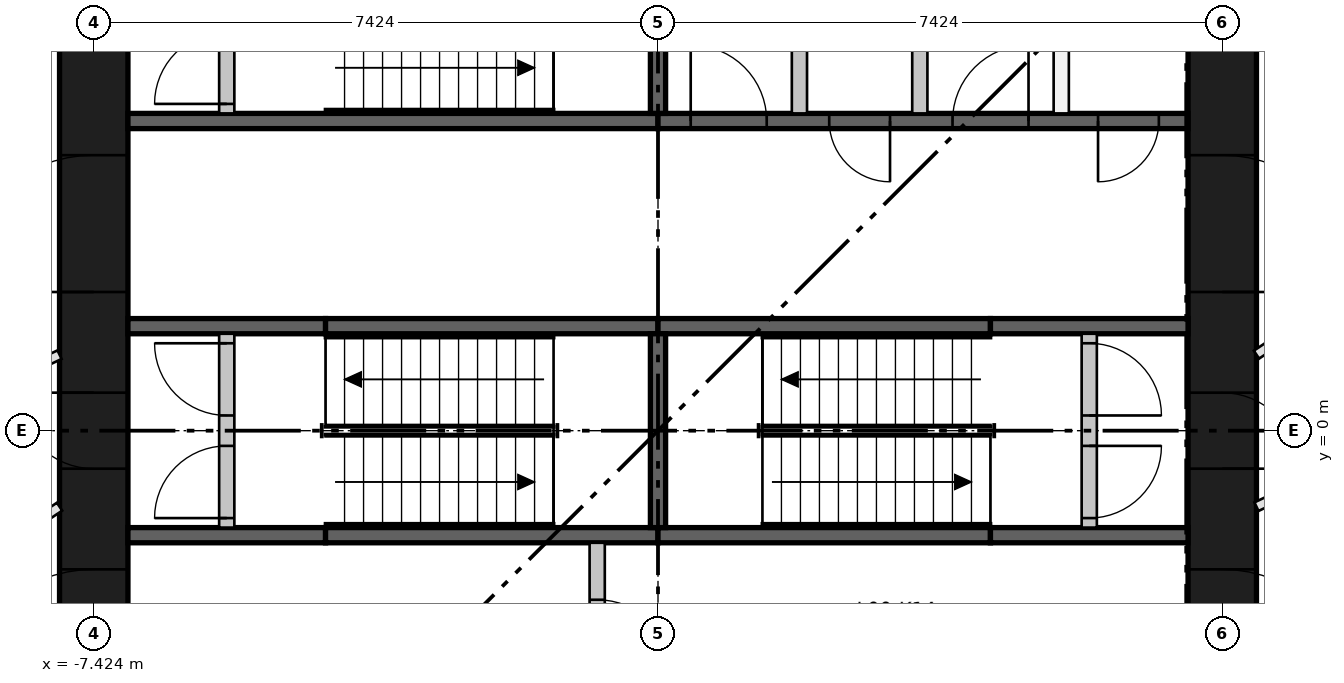
"""IFC4 building model, lengths in metres.
Left out: names, types, materials, properties, quantities, classifications, styles, units other than length and angle.
Written with IfcOpenShell. Run it as: python <this file> out.ifc"""

import sys

from ifc_helpers import new_model, si_unit, direction, frame, frame_2d, origin, place, context, subcontext, project, spatial, rectangle, extrude, element, fill, save


model = new_model("IFC4")
c1 = context("Model", 3, precision=1e-05, world=origin(), true_north=direction((0.0, 1.0)))
c2 = subcontext(c1, "Body", "Model", "MODEL_VIEW")
j1 = project(units=[si_unit("LENGTHUNIT", "METRE"), si_unit("PLANEANGLEUNIT", "RADIAN")], contexts=[c1])
p1 = place(None, origin())
s1 = spatial("IfcSite", under=j1, at=p1, CompositionType="ELEMENT")
p2 = place(p1, origin())
s2 = spatial("IfcBuilding", under=s1, at=p2, CompositionType="ELEMENT")
p3 = place(p2, origin())
s3 = spatial("IfcBuildingStorey", under=s2, at=p3, CompositionType="ELEMENT", Elevation=0.0)
p4 = place(p3, frame((-7.424, -6.974, -0.4), z_axis=(0.0, 0.0, 1.0), x_axis=(0.0, 1.0, 0.0)))
e1 = element("IfcWall", 1, at=p4, inside=s3, PredefinedType="SHEAR", context=c2, shape_type="SweptSolid", body=[
    extrude(rectangle(XDim=13.948, YDim=0.9, at=frame_2d((6.974, 0.0))), origin(), (0.0, 0.0, 1.0), 5.6),
])
p5 = place(p4, frame((6.474, 0.0, 0.4)))
e2 = element("IfcOpeningElement", 2, at=p5, cuts=e1, PredefinedType="OPENING", context=c2, shape_type="SweptSolid", body=[
    extrude(rectangle(XDim=1.0, YDim=2.1, at=frame_2d((0.5, 1.05))), frame((0.0, 0.46, 0.0), z_axis=(0.0, -1.0, 0.0), x_axis=(1.0, 0.0, 0.0)), (0.0, 0.0, 1.0), 0.92),
])
p6 = place(p4, frame((3.35, 0.0, 0.4)))
e3 = element("IfcOpeningElement", 3, at=p6, cuts=e1, PredefinedType="OPENING", context=c2, shape_type="SweptSolid", body=[
    extrude(rectangle(XDim=1.8, YDim=2.1, at=frame_2d((0.9, 1.05))), frame((0.0, 0.46, 0.0), z_axis=(0.0, -1.0, 0.0), x_axis=(1.0, 0.0, 0.0)), (0.0, 0.0, 1.0), 0.92),
])
p7 = place(p4, frame((8.799, 0.0, 0.4)))
e4 = element("IfcOpeningElement", 4, at=p7, cuts=e1, PredefinedType="OPENING", context=c2, shape_type="SweptSolid", body=[
    extrude(rectangle(XDim=1.8, YDim=2.1, at=frame_2d((0.9, 1.05))), frame((0.0, 0.46, 0.0), z_axis=(0.0, -1.0, 0.0), x_axis=(1.0, 0.0, 0.0)), (0.0, 0.0, 1.0), 0.92),
])
p8 = place(p4, frame((11.974, 0.0, 0.4)))
e5 = element("IfcOpeningElement", 5, at=p8, cuts=e1, PredefinedType="OPENING", context=c2, shape_type="SweptSolid", body=[
    extrude(rectangle(XDim=1.0, YDim=2.1, at=frame_2d((0.5, 1.05))), frame((0.0, 0.46, 0.0), z_axis=(0.0, -1.0, 0.0), x_axis=(1.0, 0.0, 0.0)), (0.0, 0.0, 1.0), 0.92),
])
p9 = place(p3, frame((7.424, -6.974, -0.4), z_axis=(0.0, 0.0, 1.0), x_axis=(0.0, 1.0, 0.0)))
e6 = element("IfcWall", 6, at=p9, inside=s3, PredefinedType="SHEAR", context=c2, shape_type="SweptSolid", body=[
    extrude(rectangle(XDim=13.948, YDim=0.9, at=frame_2d((6.974, 0.0))), origin(), (0.0, 0.0, 1.0), 5.6),
])
p10 = place(p9, frame((6.474, 0.0, 0.4)))
e7 = element("IfcOpeningElement", 7, at=p10, cuts=e6, PredefinedType="OPENING", context=c2, shape_type="SweptSolid", body=[
    extrude(rectangle(XDim=1.0, YDim=2.1, at=frame_2d((0.5, 1.05))), frame((0.0, 0.46, 0.0), z_axis=(0.0, -1.0, 0.0), x_axis=(1.0, 0.0, 0.0)), (0.0, 0.0, 1.0), 0.92),
])
p11 = place(p9, frame((3.35, 0.0, 0.4)))
e8 = element("IfcOpeningElement", 8, at=p11, cuts=e6, PredefinedType="OPENING", context=c2, shape_type="SweptSolid", body=[
    extrude(rectangle(XDim=1.8, YDim=2.1, at=frame_2d((0.9, 1.05))), frame((0.0, 0.46, 0.0), z_axis=(0.0, -1.0, 0.0), x_axis=(1.0, 0.0, 0.0)), (0.0, 0.0, 1.0), 0.92),
])
p12 = place(p9, frame((8.799, 0.0, 0.4)))
e9 = element("IfcOpeningElement", 9, at=p12, cuts=e6, PredefinedType="OPENING", context=c2, shape_type="SweptSolid", body=[
    extrude(rectangle(XDim=1.8, YDim=2.1, at=frame_2d((0.9, 1.05))), frame((0.0, 0.46, 0.0), z_axis=(0.0, -1.0, 0.0), x_axis=(1.0, 0.0, 0.0)), (0.0, 0.0, 1.0), 0.92),
])
p13 = place(p3, frame((-6.974, 4.074, 0.0), z_axis=(0.0, 0.0, 1.0), x_axis=(1.0, 0.0, 0.0)))
e10 = element("IfcWall", 10, at=p13, inside=s3, PredefinedType="SHEAR", context=c2, shape_type="SweptSolid", body=[
    extrude(rectangle(XDim=6.974, YDim=0.2, at=frame_2d((3.487, 0.0))), origin(), (0.0, 0.0, 1.0), 4.8),
])
p14 = place(p3, frame((0.0, 4.074, 0.0), z_axis=(0.0, 0.0, 1.0), x_axis=(1.0, 0.0, 0.0)))
e11 = element("IfcWall", 11, at=p14, inside=s3, PredefinedType="SHEAR", context=c2, shape_type="SweptSolid", body=[
    extrude(rectangle(XDim=6.974, YDim=0.2, at=frame_2d((3.487, 0.0))), origin(), (0.0, 0.0, 1.0), 4.8),
])
p15 = place(p14, frame((0.43, 0.0, 0.0)))
e12 = element("IfcOpeningElement", 12, at=p15, cuts=e11, PredefinedType="OPENING", context=c2, shape_type="SweptSolid", body=[
    extrude(rectangle(XDim=1.0, YDim=2.1, at=frame_2d((0.5, 1.05))), frame((0.0, 0.11, 0.0), z_axis=(0.0, -1.0, 0.0), x_axis=(1.0, 0.0, 0.0)), (0.0, 0.0, 1.0), 0.22),
])
p16 = place(p14, frame((2.253, 0.0, 0.0)))
e13 = element("IfcOpeningElement", 13, at=p16, cuts=e11, PredefinedType="OPENING", context=c2, shape_type="SweptSolid", body=[
    extrude(rectangle(XDim=0.8, YDim=2.1, at=frame_2d((0.4, 1.05))), frame((0.0, 0.11, 0.0), z_axis=(0.0, -1.0, 0.0), x_axis=(1.0, 0.0, 0.0)), (0.0, 0.0, 1.0), 0.22),
])
p17 = place(p14, frame((3.875, 0.0, 0.0)))
e14 = element("IfcOpeningElement", 14, at=p17, cuts=e11, PredefinedType="OPENING", context=c2, shape_type="SweptSolid", body=[
    extrude(rectangle(XDim=1.0, YDim=2.1, at=frame_2d((0.5, 1.05))), frame((0.0, 0.11, 0.0), z_axis=(0.0, -1.0, 0.0), x_axis=(1.0, 0.0, 0.0)), (0.0, 0.0, 1.0), 0.22),
])
p18 = place(p14, frame((5.79, 0.0, 0.0)))
e15 = element("IfcOpeningElement", 15, at=p18, cuts=e11, PredefinedType="OPENING", context=c2, shape_type="SweptSolid", body=[
    extrude(rectangle(XDim=0.8, YDim=2.1, at=frame_2d((0.4, 1.05))), frame((0.0, 0.11, 0.0), z_axis=(0.0, -1.0, 0.0), x_axis=(1.0, 0.0, 0.0)), (0.0, 0.0, 1.0), 0.22),
])
p19 = place(p3, frame((-6.974, -1.375, 0.0), z_axis=(0.0, 0.0, 1.0), x_axis=(1.0, 0.0, 0.0)))
e16 = element("IfcWall", 16, at=p19, inside=s3, PredefinedType="SHEAR", context=c2, shape_type="SweptSolid", body=[
    extrude(rectangle(XDim=2.6, YDim=0.2, at=frame_2d((1.3, 0.0))), origin(), (0.0, 0.0, 1.0), 4.8),
])
for number, where, z_axis, x_axis in (
    (17, (-4.374, -1.375, 0.0), (0.0, 0.0, 1.0), (1.0, 0.0, 0.0)),
    (18, (0.0, -1.375, 0.0), (0.0, 0.0, 1.0), (1.0, 0.0, 0.0)),
):
    element("IfcWall", number, at=place(p3, frame(where, z_axis=z_axis, x_axis=x_axis)), inside=s3, PredefinedType="SHEAR", context=c2, shape_type="SweptSolid", body=[
        extrude(rectangle(XDim=4.374, YDim=0.2, at=frame_2d((2.187, 0.0))), origin(), (0.0, 0.0, 1.0), 4.8),
    ])
for number, where, z_axis, x_axis in (
    (19, (4.374, -1.375, 0.0), (0.0, 0.0, 1.0), (1.0, 0.0, 0.0)),
    (20, (-6.974, 1.375, 0.0), (0.0, 0.0, 1.0), (1.0, 0.0, 0.0)),
):
    element("IfcWall", number, at=place(p3, frame(where, z_axis=z_axis, x_axis=x_axis)), inside=s3, PredefinedType="SHEAR", context=c2, shape_type="SweptSolid", body=[
        extrude(rectangle(XDim=2.6, YDim=0.2, at=frame_2d((1.3, 0.0))), origin(), (0.0, 0.0, 1.0), 4.8),
    ])
for number, where, z_axis, x_axis in (
    (21, (-4.374, 1.375, 0.0), (0.0, 0.0, 1.0), (1.0, 0.0, 0.0)),
    (22, (0.0, 1.375, 0.0), (0.0, 0.0, 1.0), (1.0, 0.0, 0.0)),
):
    element("IfcWall", number, at=place(p3, frame(where, z_axis=z_axis, x_axis=x_axis)), inside=s3, PredefinedType="SHEAR", context=c2, shape_type="SweptSolid", body=[
        extrude(rectangle(XDim=4.374, YDim=0.2, at=frame_2d((2.187, 0.0))), origin(), (0.0, 0.0, 1.0), 4.8),
    ])
p20 = place(p3, frame((4.374, 1.375, 0.0), z_axis=(0.0, 0.0, 1.0), x_axis=(1.0, 0.0, 0.0)))
e23 = element("IfcWall", 23, at=p20, inside=s3, PredefinedType="SHEAR", context=c2, shape_type="SweptSolid", body=[
    extrude(rectangle(XDim=2.6, YDim=0.2, at=frame_2d((1.3, 0.0))), origin(), (0.0, 0.0, 1.0), 4.8),
])
p21 = place(p3, frame((0.0, -1.275, 0.0), z_axis=(0.0, 0.0, 1.0), x_axis=(0.0, 1.0, 0.0)))
e24 = element("IfcWall", 24, at=p21, inside=s3, PredefinedType="SHEAR", context=c2, shape_type="SweptSolid", body=[
    extrude(rectangle(XDim=2.55, YDim=0.2, at=frame_2d((1.275, 0.0))), origin(), (0.0, 0.0, 1.0), 4.8),
])
p22 = place(p3, frame((-0.8, -3.974, 0.0), z_axis=(0.0, 0.0, 1.0), x_axis=(0.0, 1.0, 0.0)))
e25 = element("IfcWall", 25, at=p22, inside=s3, PredefinedType="PARTITIONING", context=c2, shape_type="SweptSolid", body=[
    extrude(rectangle(XDim=2.499, YDim=0.2, at=frame_2d((1.25, 0.0))), origin(), (0.0, 0.0, 1.0), 4.8),
])
p23 = place(p22, frame((0.75, 0.0, 0.0)))
e26 = element("IfcOpeningElement", 26, at=p23, cuts=e25, PredefinedType="OPENING", context=c2, shape_type="SweptSolid", body=[
    extrude(rectangle(XDim=1.0, YDim=2.1, at=frame_2d((0.5, 1.05))), frame((0.0, 0.11, 0.0), z_axis=(0.0, -1.0, 0.0), x_axis=(1.0, 0.0, 0.0)), (0.0, 0.0, 1.0), 0.22),
])
p24 = place(p3, frame((0.0, 4.174, 0.0), z_axis=(0.0, 0.0, 1.0), x_axis=(0.0, 1.0, 0.0)))
e27 = element("IfcWall", 27, at=p24, inside=s3, PredefinedType="SHEAR", context=c2, shape_type="SweptSolid", body=[
    extrude(rectangle(XDim=1.4, YDim=0.2, at=frame_2d((0.7, 0.0))), origin(), (0.0, 0.0, 1.0), 4.8),
])
for number, where, z_axis, x_axis in (
    (28, (1.861, 4.174, 0.0), (0.0, 0.0, 1.0), (0.0, 1.0, 0.0)),
    (29, (3.445, 4.174, 0.0), (0.0, 0.0, 1.0), (0.0, 1.0, 0.0)),
    (30, (5.305, 4.174, 0.0), (0.0, 0.0, 1.0), (0.0, 1.0, 0.0)),
):
    element("IfcWall", number, at=place(p3, frame(where, z_axis=z_axis, x_axis=x_axis)), inside=s3, PredefinedType="PARTITIONING", context=c2, shape_type="SweptSolid", body=[
        extrude(rectangle(XDim=2.8, YDim=0.2, at=frame_2d((1.4, 0.0))), origin(), (0.0, 0.0, 1.0), 4.8),
    ])
p25 = place(p3, frame((-5.674, -1.275, 0.0), z_axis=(0.0, 0.0, 1.0), x_axis=(0.0, 1.0, 0.0)))
e31 = element("IfcWall", 31, at=p25, inside=s3, PredefinedType="PARTITIONING", context=c2, shape_type="SweptSolid", body=[
    extrude(rectangle(XDim=2.55, YDim=0.2, at=frame_2d((1.275, 0.0))), origin(), (0.0, 0.0, 1.0), 4.8),
])
p26 = place(p25, frame((0.125, 0.0, 0.0)))
e32 = element("IfcOpeningElement", 32, at=p26, cuts=e31, PredefinedType="OPENING", context=c2, shape_type="SweptSolid", body=[
    extrude(rectangle(XDim=0.95, YDim=2.1, at=frame_2d((0.475, 1.05))), frame((0.0, 0.11, 0.0), z_axis=(0.0, -1.0, 0.0), x_axis=(1.0, 0.0, 0.0)), (0.0, 0.0, 1.0), 0.22),
])
p27 = place(p25, frame((1.475, 0.0, 0.0)))
e33 = element("IfcOpeningElement", 33, at=p27, cuts=e31, PredefinedType="OPENING", context=c2, shape_type="SweptSolid", body=[
    extrude(rectangle(XDim=0.95, YDim=2.1, at=frame_2d((0.475, 1.05))), frame((0.0, 0.11, 0.0), z_axis=(0.0, -1.0, 0.0), x_axis=(1.0, 0.0, 0.0)), (0.0, 0.0, 1.0), 0.22),
])
p28 = place(p3, frame((5.674, -1.275, 0.0), z_axis=(0.0, 0.0, 1.0), x_axis=(0.0, 1.0, 0.0)))
e34 = element("IfcWall", 34, at=p28, inside=s3, PredefinedType="PARTITIONING", context=c2, shape_type="SweptSolid", body=[
    extrude(rectangle(XDim=2.55, YDim=0.2, at=frame_2d((1.275, 0.0))), origin(), (0.0, 0.0, 1.0), 4.8),
])
p29 = place(p28, frame((0.125, 0.0, 0.0)))
e35 = element("IfcOpeningElement", 35, at=p29, cuts=e34, PredefinedType="OPENING", context=c2, shape_type="SweptSolid", body=[
    extrude(rectangle(XDim=0.95, YDim=2.1, at=frame_2d((0.475, 1.05))), frame((0.0, 0.11, 0.0), z_axis=(0.0, -1.0, 0.0), x_axis=(1.0, 0.0, 0.0)), (0.0, 0.0, 1.0), 0.22),
])
p30 = place(p28, frame((1.475, 0.0, 0.0)))
e36 = element("IfcOpeningElement", 36, at=p30, cuts=e34, PredefinedType="OPENING", context=c2, shape_type="SweptSolid", body=[
    extrude(rectangle(XDim=0.95, YDim=2.1, at=frame_2d((0.475, 1.05))), frame((0.0, 0.11, 0.0), z_axis=(0.0, -1.0, 0.0), x_axis=(1.0, 0.0, 0.0)), (0.0, 0.0, 1.0), 0.22),
])
p31 = place(p3, frame((-5.674, 4.174, 0.0), z_axis=(0.0, 0.0, 1.0), x_axis=(0.0, 1.0, 0.0)))
e37 = element("IfcWall", 37, at=p31, inside=s3, PredefinedType="PARTITIONING", context=c2, shape_type="SweptSolid", body=[
    extrude(rectangle(XDim=2.8, YDim=0.2, at=frame_2d((1.4, 0.0))), origin(), (0.0, 0.0, 1.0), 4.8),
])
p32 = place(p31, frame((0.125, 0.0, 0.0)))
e38 = element("IfcOpeningElement", 38, at=p32, cuts=e37, PredefinedType="OPENING", context=c2, shape_type="SweptSolid", body=[
    extrude(rectangle(XDim=0.95, YDim=2.1, at=frame_2d((0.475, 1.05))), frame((0.0, 0.11, 0.0), z_axis=(0.0, -1.0, 0.0), x_axis=(1.0, 0.0, 0.0)), (0.0, 0.0, 1.0), 0.22),
])
p33 = place(p31, frame((1.725, 0.0, 0.0)))
e39 = element("IfcOpeningElement", 39, at=p33, cuts=e37, PredefinedType="OPENING", context=c2, shape_type="SweptSolid", body=[
    extrude(rectangle(XDim=0.95, YDim=2.1, at=frame_2d((0.475, 1.05))), frame((0.0, 0.11, 0.0), z_axis=(0.0, -1.0, 0.0), x_axis=(1.0, 0.0, 0.0)), (0.0, 0.0, 1.0), 0.22),
])
p34 = place(p3, frame((11.723, 3.589, 0.0), z_axis=(0.0, 0.0, 1.0), x_axis=(-0.829735405584, -0.5581569284, 0.0)))
e40 = element("IfcWall", 40, at=p34, inside=s3, PredefinedType="PARTITIONING", context=c2, shape_type="SweptSolid", body=[
    extrude(rectangle(XDim=4.639, YDim=0.125, at=frame_2d((2.319, 0.0))), origin(), (0.0, 0.0, 1.0), 4.8),
])
p35 = place(p3, frame((-7.874, 1.0, 0.0), z_axis=(0.0, 0.0, 1.0), x_axis=(-0.90340417802, -0.428790031527, 0.0)))
e41 = element("IfcWall", 41, at=p35, inside=s3, PredefinedType="PARTITIONING", context=c2, shape_type="SweptSolid", body=[
    extrude(rectangle(XDim=4.816, YDim=0.125, at=frame_2d((2.408, 0.0))), origin(), (0.0, 0.0, 1.0), 4.8),
])
p36 = place(p35, frame((1.9, 0.0, 0.0)))
e42 = element("IfcOpeningElement", 42, at=p36, cuts=e41, PredefinedType="OPENING", context=c2, shape_type="SweptSolid", body=[
    extrude(rectangle(XDim=1.0, YDim=2.1, at=frame_2d((0.5, 1.05))), frame((0.0, 0.073, 0.0), z_axis=(0.0, -1.0, 0.0), x_axis=(1.0, 0.0, 0.0)), (0.0, 0.0, 1.0), 0.145),
])
p37 = place(p3, frame((-11.723, -3.589, 0.0), z_axis=(0.0, 0.0, 1.0), x_axis=(0.829735405584, 0.5581569284, 0.0)))
e43 = element("IfcWall", 43, at=p37, inside=s3, PredefinedType="PARTITIONING", context=c2, shape_type="SweptSolid", body=[
    extrude(rectangle(XDim=4.639, YDim=0.125, at=frame_2d((2.319, 0.0))), origin(), (0.0, 0.0, 1.0), 4.8),
])
p38 = place(p3, frame((7.874, -1.0, 0.0), z_axis=(0.0, 0.0, 1.0), x_axis=(0.90340417802, 0.428790031527, 0.0)))
e44 = element("IfcWall", 44, at=p38, inside=s3, PredefinedType="PARTITIONING", context=c2, shape_type="SweptSolid", body=[
    extrude(rectangle(XDim=4.816, YDim=0.125, at=frame_2d((2.408, 0.0))), origin(), (0.0, 0.0, 1.0), 4.8),
])
p39 = place(p38, frame((1.9, 0.0, 0.0)))
e45 = element("IfcOpeningElement", 45, at=p39, cuts=e44, PredefinedType="OPENING", context=c2, shape_type="SweptSolid", body=[
    extrude(rectangle(XDim=1.0, YDim=2.1, at=frame_2d((0.5, 1.05))), frame((0.0, 0.073, 0.0), z_axis=(0.0, -1.0, 0.0), x_axis=(1.0, 0.0, 0.0)), (0.0, 0.0, 1.0), 0.145),
])
p40 = place(p26, origin())
e46 = element("IfcDoor", 46, at=p40, inside=s3, OperationType="SINGLE_SWING_LEFT", PredefinedType="DOOR", context=c2, shape_type="SweptSolid", body=[
    extrude(rectangle(XDim=0.95, YDim=2.1, at=frame_2d((0.475, 1.05))), frame((0.0, 0.025, 0.0), z_axis=(0.0, -1.0, 0.0), x_axis=(1.0, 0.0, 0.0)), (0.0, 0.0, 1.0), 0.05),
])
fill(e32, e46)
p41 = place(p27, origin())
e47 = element("IfcDoor", 47, at=p41, inside=s3, OperationType="SINGLE_SWING_RIGHT", PredefinedType="DOOR", context=c2, shape_type="SweptSolid", body=[
    extrude(rectangle(XDim=0.95, YDim=2.1, at=frame_2d((0.475, 1.05))), frame((0.0, 0.025, 0.0), z_axis=(0.0, -1.0, 0.0), x_axis=(1.0, 0.0, 0.0)), (0.0, 0.0, 1.0), 0.05),
])
fill(e33, e47)
p42 = place(p29, frame((0.95, 0.0, 0.0), z_axis=(0.0, 0.0, 1.0), x_axis=(-1.0, 0.0, 0.0)))
e48 = element("IfcDoor", 48, at=p42, inside=s3, OperationType="SINGLE_SWING_RIGHT", PredefinedType="DOOR", context=c2, shape_type="SweptSolid", body=[
    extrude(rectangle(XDim=0.95, YDim=2.1, at=frame_2d((0.475, 1.05))), frame((0.0, 0.025, 0.0), z_axis=(0.0, -1.0, 0.0), x_axis=(1.0, 0.0, 0.0)), (0.0, 0.0, 1.0), 0.05),
])
fill(e35, e48)
p43 = place(p30, frame((0.95, 0.0, 0.0), z_axis=(0.0, 0.0, 1.0), x_axis=(-1.0, 0.0, 0.0)))
e49 = element("IfcDoor", 49, at=p43, inside=s3, OperationType="SINGLE_SWING_LEFT", PredefinedType="DOOR", context=c2, shape_type="SweptSolid", body=[
    extrude(rectangle(XDim=0.95, YDim=2.1, at=frame_2d((0.475, 1.05))), frame((0.0, 0.025, 0.0), z_axis=(0.0, -1.0, 0.0), x_axis=(1.0, 0.0, 0.0)), (0.0, 0.0, 1.0), 0.05),
])
fill(e36, e49)
p44 = place(p32, origin())
e50 = element("IfcDoor", 50, at=p44, inside=s3, OperationType="SINGLE_SWING_LEFT", PredefinedType="DOOR", context=c2, shape_type="SweptSolid", body=[
    extrude(rectangle(XDim=0.95, YDim=2.1, at=frame_2d((0.475, 1.05))), frame((0.0, 0.025, 0.0), z_axis=(0.0, -1.0, 0.0), x_axis=(1.0, 0.0, 0.0)), (0.0, 0.0, 1.0), 0.05),
])
fill(e38, e50)
p45 = place(p23, frame((1.0, 0.0, 0.0), z_axis=(0.0, 0.0, 1.0), x_axis=(-1.0, 0.0, 0.0)))
e51 = element("IfcDoor", 51, at=p45, inside=s3, OperationType="SINGLE_SWING_LEFT", PredefinedType="DOOR", context=c2, shape_type="SweptSolid", body=[
    extrude(rectangle(XDim=1.0, YDim=2.1, at=frame_2d((0.5, 1.05))), frame((0.0, 0.025, 0.0), z_axis=(0.0, -1.0, 0.0), x_axis=(1.0, 0.0, 0.0)), (0.0, 0.0, 1.0), 0.05),
])
fill(e26, e51)
p46 = place(p15, origin())
e52 = element("IfcDoor", 52, at=p46, inside=s3, OperationType="SINGLE_SWING_LEFT", PredefinedType="DOOR", context=c2, shape_type="SweptSolid", body=[
    extrude(rectangle(XDim=1.0, YDim=2.1, at=frame_2d((0.5, 1.05))), frame((0.0, 0.025, 0.0), z_axis=(0.0, -1.0, 0.0), x_axis=(1.0, 0.0, 0.0)), (0.0, 0.0, 1.0), 0.05),
])
fill(e12, e52)
p47 = place(p16, frame((0.8, 0.0, 0.0), z_axis=(0.0, 0.0, 1.0), x_axis=(-1.0, 0.0, 0.0)))
e53 = element("IfcDoor", 53, at=p47, inside=s3, OperationType="SINGLE_SWING_RIGHT", PredefinedType="DOOR", context=c2, shape_type="SweptSolid", body=[
    extrude(rectangle(XDim=0.8, YDim=2.1, at=frame_2d((0.4, 1.05))), frame((0.0, 0.025, 0.0), z_axis=(0.0, -1.0, 0.0), x_axis=(1.0, 0.0, 0.0)), (0.0, 0.0, 1.0), 0.05),
])
fill(e13, e53)
p48 = place(p17, origin())
e54 = element("IfcDoor", 54, at=p48, inside=s3, OperationType="SINGLE_SWING_RIGHT", PredefinedType="DOOR", context=c2, shape_type="SweptSolid", body=[
    extrude(rectangle(XDim=1.0, YDim=2.1, at=frame_2d((0.5, 1.05))), frame((0.0, 0.025, 0.0), z_axis=(0.0, -1.0, 0.0), x_axis=(1.0, 0.0, 0.0)), (0.0, 0.0, 1.0), 0.05),
])
fill(e14, e54)
p49 = place(p18, frame((0.8, 0.0, 0.0), z_axis=(0.0, 0.0, 1.0), x_axis=(-1.0, 0.0, 0.0)))
e55 = element("IfcDoor", 55, at=p49, inside=s3, OperationType="SINGLE_SWING_LEFT", PredefinedType="DOOR", context=c2, shape_type="SweptSolid", body=[
    extrude(rectangle(XDim=0.8, YDim=2.1, at=frame_2d((0.4, 1.05))), frame((0.0, 0.025, 0.0), z_axis=(0.0, -1.0, 0.0), x_axis=(1.0, 0.0, 0.0)), (0.0, 0.0, 1.0), 0.05),
])
fill(e15, e55)
p50 = place(p5, origin())
e56 = element("IfcDoor", 56, at=p50, inside=s3, OperationType="SINGLE_SWING_RIGHT", PredefinedType="DOOR", context=c2, shape_type="SweptSolid", body=[
    extrude(rectangle(XDim=1.0, YDim=2.1, at=frame_2d((0.5, 1.05))), frame((0.0, 0.025, 0.0), z_axis=(0.0, -1.0, 0.0), x_axis=(1.0, 0.0, 0.0)), (0.0, 0.0, 1.0), 0.05),
])
fill(e2, e56)
p51 = place(p6, origin())
e57 = element("IfcDoor", 57, at=p51, inside=s3, OperationType="DOUBLE_DOOR_SINGLE_SWING", PredefinedType="DOOR", context=c2, shape_type="SweptSolid", body=[
    extrude(rectangle(XDim=1.8, YDim=2.1, at=frame_2d((0.9, 1.05))), frame((0.0, 0.025, 0.0), z_axis=(0.0, -1.0, 0.0), x_axis=(1.0, 0.0, 0.0)), (0.0, 0.0, 1.0), 0.05),
])
fill(e3, e57)
p52 = place(p7, origin())
e58 = element("IfcDoor", 58, at=p52, inside=s3, OperationType="DOUBLE_DOOR_SINGLE_SWING", PredefinedType="DOOR", context=c2, shape_type="SweptSolid", body=[
    extrude(rectangle(XDim=1.8, YDim=2.1, at=frame_2d((0.9, 1.05))), frame((0.0, 0.025, 0.0), z_axis=(0.0, -1.0, 0.0), x_axis=(1.0, 0.0, 0.0)), (0.0, 0.0, 1.0), 0.05),
])
fill(e4, e58)
p53 = place(p10, frame((1.0, 0.0, 0.0), z_axis=(0.0, 0.0, 1.0), x_axis=(-1.0, 0.0, 0.0)))
e59 = element("IfcDoor", 59, at=p53, inside=s3, OperationType="SINGLE_SWING_LEFT", PredefinedType="DOOR", context=c2, shape_type="SweptSolid", body=[
    extrude(rectangle(XDim=1.0, YDim=2.1, at=frame_2d((0.5, 1.05))), frame((0.0, 0.025, 0.0), z_axis=(0.0, -1.0, 0.0), x_axis=(1.0, 0.0, 0.0)), (0.0, 0.0, 1.0), 0.05),
])
fill(e7, e59)
p54 = place(p11, frame((1.8, 0.0, 0.0), z_axis=(0.0, 0.0, 1.0), x_axis=(-1.0, 0.0, 0.0)))
e60 = element("IfcDoor", 60, at=p54, inside=s3, OperationType="DOUBLE_DOOR_SINGLE_SWING", PredefinedType="DOOR", context=c2, shape_type="SweptSolid", body=[
    extrude(rectangle(XDim=1.8, YDim=2.1, at=frame_2d((0.9, 1.05))), frame((0.0, 0.025, 0.0), z_axis=(0.0, -1.0, 0.0), x_axis=(1.0, 0.0, 0.0)), (0.0, 0.0, 1.0), 0.05),
])
fill(e8, e60)
p55 = place(p12, frame((1.8, 0.0, 0.0), z_axis=(0.0, 0.0, 1.0), x_axis=(-1.0, 0.0, 0.0)))
e61 = element("IfcDoor", 61, at=p55, inside=s3, OperationType="DOUBLE_DOOR_SINGLE_SWING", PredefinedType="DOOR", context=c2, shape_type="SweptSolid", body=[
    extrude(rectangle(XDim=1.8, YDim=2.1, at=frame_2d((0.9, 1.05))), frame((0.0, 0.025, 0.0), z_axis=(0.0, -1.0, 0.0), x_axis=(1.0, 0.0, 0.0)), (0.0, 0.0, 1.0), 0.05),
])
fill(e9, e61)
save(model, sys.argv[1])
